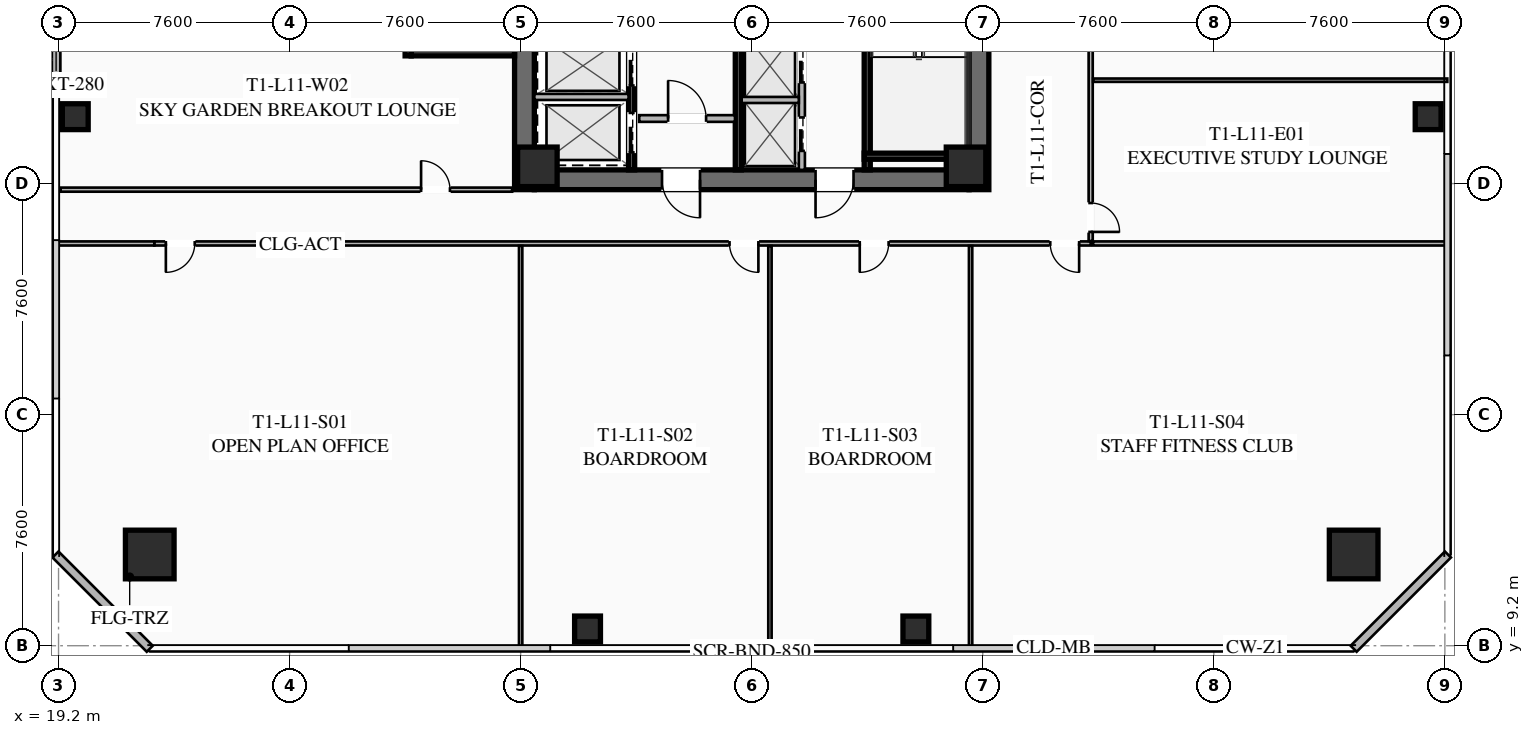
"""IFC4 building model, lengths in metres.
Left out: names, types, materials, properties, quantities, classifications, styles, units other than length and angle.
Written with IfcOpenShell. Run it as: python <this file> out.ifc"""

import sys

from ifc_helpers import new_model, si_unit, direction, frame, frame_2d, origin, origin_2d, place, context, subcontext, project, spatial, rectangle, hollow_rectangle, extrude, element, fill, save


model = new_model("IFC4")
c1 = context("Model", 3, precision=1e-05, world=origin(), true_north=direction((0.0, 1.0)))
c2 = subcontext(c1, "Body", "Model", "MODEL_VIEW")
j1 = project(units=[si_unit("LENGTHUNIT", "METRE"), si_unit("PLANEANGLEUNIT", "RADIAN")], contexts=[c1])
p1 = place(None, origin())
s1 = spatial("IfcSite", under=j1, at=p1, CompositionType="ELEMENT")
p2 = place(p1, origin())
s2 = spatial("IfcBuilding", under=s1, at=p2, CompositionType="ELEMENT")
p3 = place(p2, frame((0.0, 0.0, 45.9)))
s3 = spatial("IfcBuildingStorey", under=s2, at=p3, CompositionType="ELEMENT", Elevation=45.9)
for number, where, z_axis, x_axis in (
    (1, (34.525, 24.2, 0.0), (0.0, 0.0, 1.0), (0.0, 1.0, 0.0)),
    (2, (49.475, 39.8, 0.0), (0.0, 0.0, 1.0), (0.0, -1.0, 0.0)),
):
    element("IfcWall", number, at=place(p3, frame(where, z_axis=z_axis, x_axis=x_axis)), inside=s3, PredefinedType="SHEAR", context=c2, shape_type="SweptSolid", body=[
        extrude(rectangle(XDim=15.6, YDim=0.65, at=frame_2d((7.8, 0.0))), origin(), (0.0, 0.0, 1.0), 3.55),
    ])
p4 = place(p3, frame((49.15, 24.525, 0.0), z_axis=(0.0, 0.0, 1.0), x_axis=(-1.0, 0.0, 0.0)))
e3 = element("IfcWall", 3, at=p4, inside=s3, PredefinedType="SHEAR", context=c2, shape_type="SweptSolid", body=[
    extrude(rectangle(XDim=14.3, YDim=0.65, at=frame_2d((7.15, 0.0))), origin(), (0.0, 0.0, 1.0), 3.55),
])
p5 = place(p4, frame((8.85, 0.0, 0.0)))
e4 = element("IfcOpeningElement", 4, at=p5, cuts=e3, PredefinedType="OPENING", context=c2, shape_type="SweptSolid", body=[
    extrude(rectangle(XDim=1.25, YDim=2.25, at=frame_2d((0.625, 1.125))), frame((0.0, 0.335, 0.0), z_axis=(0.0, -1.0, 0.0), x_axis=(1.0, 0.0, 0.0)), (0.0, 0.0, 1.0), 0.67),
])
p6 = place(p4, frame((3.8, 0.0, 0.0)))
e5 = element("IfcOpeningElement", 5, at=p6, cuts=e3, PredefinedType="OPENING", context=c2, shape_type="SweptSolid", body=[
    extrude(rectangle(XDim=1.25, YDim=2.25, at=frame_2d((0.625, 1.125))), frame((0.0, 0.335, 0.0), z_axis=(0.0, -1.0, 0.0), x_axis=(1.0, 0.0, 0.0)), (0.0, 0.0, 1.0), 0.67),
])
for number, where, z_axis, x_axis in (
    (6, (34.95, 24.95, 0.0), (0.0, 0.0, 1.0), (1.0, 0.0, 0.0)),
    (7, (49.05, 24.95, 0.0), (0.0, 0.0, 1.0), (1.0, 0.0, 0.0)),
):
    element("IfcColumn", number, at=place(p3, frame(where, z_axis=z_axis, x_axis=x_axis)), inside=s3, PredefinedType="COLUMN", context=c2, shape_type="SweptSolid", body=[
        extrude(hollow_rectangle(XDim=1.3, YDim=1.3, WallThickness=0.05, at=origin_2d()), origin(), (0.0, 0.0, 1.0), 3.35),
    ])
for number, where, z_axis, x_axis in (
    (8, (22.2, 12.2, 0.0), (0.0, 0.0, 1.0), (1.0, 0.0, 0.0)),
    (9, (61.8, 12.2, 0.0), (0.0, 0.0, 1.0), (1.0, 0.0, 0.0)),
):
    element("IfcColumn", number, at=place(p3, frame(where, z_axis=z_axis, x_axis=x_axis)), inside=s3, PredefinedType="COLUMN", context=c2, shape_type="SweptSolid", body=[
        extrude(hollow_rectangle(XDim=1.6, YDim=1.6, WallThickness=0.06, at=origin_2d()), origin(), (0.0, 0.0, 1.0), 3.35),
    ])
for number, where, z_axis, x_axis in (
    (10, (36.6, 9.75, 0.0), (0.0, 0.0, 1.0), (1.0, 0.0, 0.0)),
    (11, (47.4, 9.75, 0.0), (0.0, 0.0, 1.0), (1.0, 0.0, 0.0)),
    (12, (64.25, 26.6, 0.0), (0.0, 0.0, 1.0), (1.0, 0.0, 0.0)),
    (13, (19.75, 26.6, 0.0), (0.0, 0.0, 1.0), (1.0, 0.0, 0.0)),
):
    element("IfcColumn", number, at=place(p3, frame(where, z_axis=z_axis, x_axis=x_axis)), inside=s3, PredefinedType="COLUMN", context=c2, shape_type="SweptSolid", body=[
        extrude(hollow_rectangle(XDim=0.85, YDim=0.85, WallThickness=0.035, at=origin_2d()), origin(), (0.0, 0.0, 1.0), 3.35),
    ])
p7 = place(p3, frame((19.12, 27.75, 0.0), z_axis=(0.0, 0.0, 1.0), x_axis=(0.0, 1.0, 0.0)))
e14 = element("IfcWall", 14, at=p7, inside=s3, PredefinedType="SOLIDWALL", context=c2, shape_type="SweptSolid", body=[
    extrude(rectangle(XDim=8.5, YDim=0.28, at=frame_2d((4.25, 0.0))), origin(), (0.0, 0.0, 1.0), 3.35),
])
p8 = place(p7, frame((3.6, 0.0, 0.0)))
e15 = element("IfcOpeningElement", 15, at=p8, cuts=e14, PredefinedType="OPENING", context=c2, shape_type="SweptSolid", body=[
    extrude(rectangle(XDim=1.3, YDim=2.15, at=frame_2d((0.65, 1.075))), frame((0.0, 0.15, 0.0), z_axis=(0.0, -1.0, 0.0), x_axis=(1.0, 0.0, 0.0)), (0.0, 0.0, 1.0), 0.3),
])
p9 = place(p7, frame((1.46, 0.0, 0.85)))
e16 = element("IfcOpeningElement", 16, at=p9, cuts=e14, PredefinedType="OPENING", context=c2, shape_type="SweptSolid", body=[
    extrude(rectangle(XDim=1.8, YDim=1.92, at=frame_2d((0.9, 0.96))), frame((0.0, 0.15, 0.0), z_axis=(0.0, -1.0, 0.0), x_axis=(1.0, 0.0, 0.0)), (0.0, 0.0, 1.0), 0.3),
])
for number, where, z_axis, x_axis in (
    (17, (22.2, 9.1, 0.0), (0.0, 0.0, 1.0), (-0.707, 0.707, 0.0)),
    (18, (64.9, 12.2, 0.0), (0.0, 0.0, 1.0), (-0.707, -0.707, 0.0)),
):
    element("IfcWall", number, at=place(p3, frame(where, z_axis=z_axis, x_axis=x_axis)), inside=s3, PredefinedType="SOLIDWALL", context=c2, shape_type="SweptSolid", body=[
        extrude(rectangle(XDim=4.384, YDim=0.28, at=frame_2d((2.192, 0.0))), origin(), (0.0, 0.0, 1.0), 3.35),
    ])
p10 = place(p3, frame((45.8, 32.8, 0.0), z_axis=(0.0, 0.0, 1.0), x_axis=(0.0, -1.0, 0.0)))
e19 = element("IfcWall", 19, at=p10, inside=s3, PredefinedType="SHEAR", context=c2, shape_type="SweptSolid", body=[
    extrude(rectangle(XDim=7.95, YDim=0.2, at=frame_2d((3.975, 0.0))), origin(), (0.0, 0.0, 1.0), 3.35),
])
p11 = place(p10, frame((0.45, 0.0, 0.0)))
e20 = element("IfcOpeningElement", 20, at=p11, cuts=e19, PredefinedType="OPENING", context=c2, shape_type="SweptSolid", body=[
    extrude(rectangle(XDim=1.15, YDim=2.2, at=frame_2d((0.575, 1.1))), frame((0.0, 0.11, 0.0), z_axis=(0.0, -1.0, 0.0), x_axis=(1.0, 0.0, 0.0)), (0.0, 0.0, 1.0), 0.22),
])
p12 = place(p3, frame((45.7, 25.3, 0.0), z_axis=(0.0, 0.0, 1.0), x_axis=(1.0, 0.0, 0.0)))
e21 = element("IfcWall", 21, at=p12, inside=s3, PredefinedType="SHEAR", context=c2, shape_type="SweptSolid", body=[
    extrude(rectangle(XDim=3.45, YDim=0.2, at=frame_2d((1.725, 0.0))), origin(), (0.0, 0.0, 1.0), 3.35),
])
p13 = place(p3, frame((41.56, 24.85, 0.0), z_axis=(0.0, 0.0, 1.0), x_axis=(0.0, 1.0, 0.0)))
e22 = element("IfcWall", 22, at=p13, inside=s3, PredefinedType="SHEAR", context=c2, shape_type="SweptSolid", body=[
    extrude(rectangle(XDim=14.3, YDim=0.2, at=frame_2d((7.15, 0.0))), origin(), (0.0, 0.0, 1.0), 3.35),
])
p14 = place(p3, frame((38.3, 26.54, 0.0), z_axis=(0.0, 0.0, 1.0), x_axis=(1.0, 0.0, 0.0)))
e23 = element("IfcWall", 23, at=p14, inside=s3, PredefinedType="SOLIDWALL", context=c2, shape_type="SweptSolid", body=[
    extrude(rectangle(XDim=3.15, YDim=0.22, at=frame_2d((1.575, 0.0))), origin(), (0.0, 0.0, 1.0), 2.703),
])
p15 = place(p14, frame((0.95, 0.0, 0.0)))
e24 = element("IfcOpeningElement", 24, at=p15, cuts=e23, PredefinedType="OPENING", context=c2, shape_type="SweptSolid", body=[
    extrude(rectangle(XDim=1.25, YDim=2.25, at=frame_2d((0.625, 1.125))), frame((0.0, 0.12, 0.0), z_axis=(0.0, -1.0, 0.0), x_axis=(1.0, 0.0, 0.0)), (0.0, 0.0, 1.0), 0.24),
])
p16 = place(p3, frame((38.05, 24.85, 0.0), z_axis=(0.0, 0.0, 1.0), x_axis=(0.0, 1.0, 0.0)))
e25 = element("IfcWall", 25, at=p16, inside=s3, PredefinedType="SHEAR", context=c2, shape_type="SweptSolid", body=[
    extrude(rectangle(XDim=6.35, YDim=0.2, at=frame_2d((3.175, 0.0))), origin(), (0.0, 0.0, 1.0), 3.35),
])
p17 = place(p16, frame((4.775, 0.0, 0.0)))
e26 = element("IfcOpeningElement", 26, at=p17, cuts=e25, PredefinedType="OPENING", context=c2, shape_type="SweptSolid", body=[
    extrude(rectangle(XDim=1.3, YDim=2.25, at=frame_2d((0.65, 1.125))), frame((0.0, 0.11, 0.0), z_axis=(0.0, -1.0, 0.0), x_axis=(1.0, 0.0, 0.0)), (0.0, 0.0, 1.0), 0.22),
])
p18 = place(p16, frame((2.775, 0.0, 0.0)))
e27 = element("IfcOpeningElement", 27, at=p18, cuts=e25, PredefinedType="OPENING", context=c2, shape_type="SweptSolid", body=[
    extrude(rectangle(XDim=1.3, YDim=2.25, at=frame_2d((0.65, 1.125))), frame((0.0, 0.11, 0.0), z_axis=(0.0, -1.0, 0.0), x_axis=(1.0, 0.0, 0.0)), (0.0, 0.0, 1.0), 0.22),
])
p19 = place(p16, frame((0.575, 0.0, 0.0)))
e28 = element("IfcOpeningElement", 28, at=p19, cuts=e25, PredefinedType="OPENING", context=c2, shape_type="SweptSolid", body=[
    extrude(rectangle(XDim=1.3, YDim=2.25, at=frame_2d((0.65, 1.125))), frame((0.0, 0.11, 0.0), z_axis=(0.0, -1.0, 0.0), x_axis=(1.0, 0.0, 0.0)), (0.0, 0.0, 1.0), 0.22),
])
p20 = place(p3, frame((34.85, 27.25, 0.0), z_axis=(0.0, 0.0, 1.0), x_axis=(1.0, 0.0, 0.0)))
e29 = element("IfcWall", 29, at=p20, inside=s3, PredefinedType="SOLIDWALL", context=c2, shape_type="SweptSolid", body=[
    extrude(rectangle(XDim=3.1, YDim=0.2, at=frame_2d((1.55, 0.0))), origin(), (0.0, 0.0, 1.0), 3.35),
])
p21 = place(p3, frame((43.65, 24.85, 0.0), z_axis=(0.0, 0.0, 1.0), x_axis=(0.0, 1.0, 0.0)))
e30 = element("IfcWall", 30, at=p21, inside=s3, PredefinedType="SOLIDWALL", context=c2, shape_type="SweptSolid", body=[
    extrude(rectangle(XDim=6.8, YDim=0.2, at=frame_2d((3.4, 0.0))), origin(), (0.0, 0.0, 1.0), 3.35),
])
p22 = place(p21, frame((0.625, 0.0, 0.0)))
e31 = element("IfcOpeningElement", 31, at=p22, cuts=e30, PredefinedType="OPENING", context=c2, shape_type="SweptSolid", body=[
    extrude(rectangle(XDim=1.1, YDim=2.2, at=frame_2d((0.55, 1.1))), frame((0.0, 0.11, 0.0), z_axis=(0.0, -1.0, 0.0), x_axis=(1.0, 0.0, 0.0)), (0.0, 0.0, 1.0), 0.22),
])
p23 = place(p21, frame((2.875, 0.0, 0.0)))
e32 = element("IfcOpeningElement", 32, at=p23, cuts=e30, PredefinedType="OPENING", context=c2, shape_type="SweptSolid", body=[
    extrude(rectangle(XDim=1.1, YDim=2.2, at=frame_2d((0.55, 1.1))), frame((0.0, 0.11, 0.0), z_axis=(0.0, -1.0, 0.0), x_axis=(1.0, 0.0, 0.0)), (0.0, 0.0, 1.0), 0.22),
])
p24 = place(p21, frame((5.125, 0.0, 0.0)))
e33 = element("IfcOpeningElement", 33, at=p24, cuts=e30, PredefinedType="OPENING", context=c2, shape_type="SweptSolid", body=[
    extrude(rectangle(XDim=1.1, YDim=2.2, at=frame_2d((0.55, 1.1))), frame((0.0, 0.11, 0.0), z_axis=(0.0, -1.0, 0.0), x_axis=(1.0, 0.0, 0.0)), (0.0, 0.0, 1.0), 0.22),
])
p25 = place(p3, frame((41.67, 27.15, 0.0), z_axis=(0.0, 0.0, 1.0), x_axis=(1.0, 0.0, 0.0)))
e34 = element("IfcWall", 34, at=p25, inside=s3, PredefinedType="SOLIDWALL", context=c2, shape_type="SweptSolid", body=[
    extrude(rectangle(XDim=1.88, YDim=0.2, at=frame_2d((0.94, 0.0))), origin(), (0.0, 0.0, 1.0), 3.35),
])
p26 = place(p3, frame((30.7, 28.6, 0.0), z_axis=(0.0, 0.0, 1.0), x_axis=(0.0, 1.0, 0.0)))
e35 = element("IfcWall", 35, at=p26, inside=s3, PredefinedType="SHEAR", context=c2, shape_type="SweptSolid", body=[
    extrude(rectangle(XDim=6.8, YDim=0.2, at=frame_2d((3.4, 0.0))), origin(), (0.0, 0.0, 1.0), 3.35),
])
p27 = place(p3, frame((30.8, 28.7, 0.0), z_axis=(0.0, 0.0, 1.0), x_axis=(1.0, 0.0, 0.0)))
e36 = element("IfcWall", 36, at=p27, inside=s3, PredefinedType="SHEAR", context=c2, shape_type="SweptSolid", body=[
    extrude(rectangle(XDim=3.4, YDim=0.2, at=frame_2d((1.7, 0.0))), origin(), (0.0, 0.0, 1.0), 3.35),
])
p28 = place(p3, frame((53.15, 22.43, 0.0), z_axis=(0.0, 0.0, 1.0), x_axis=(-1.0, 0.0, 0.0)))
e37 = element("IfcWall", 37, at=p28, inside=s3, PredefinedType="PARTITIONING", context=c2, shape_type="SweptSolid", body=[
    extrude(rectangle(XDim=30.8, YDim=0.135, at=frame_2d((15.4, 0.0))), origin(), (0.0, 0.0, 1.0), 2.703),
])
p29 = place(p28, frame((29.47, 0.0, 0.0)))
e38 = element("IfcOpeningElement", 38, at=p29, cuts=e37, PredefinedType="OPENING", context=c2, shape_type="SweptSolid", body=[
    extrude(rectangle(XDim=0.95, YDim=2.05, at=frame_2d((0.475, 1.025))), frame((0.0, 0.077, 0.0), z_axis=(0.0, -1.0, 0.0), x_axis=(1.0, 0.0, 0.0)), (0.0, 0.0, 1.0), 0.155),
])
p30 = place(p28, frame((10.93, 0.0, 0.0)))
e39 = element("IfcOpeningElement", 39, at=p30, cuts=e37, PredefinedType="OPENING", context=c2, shape_type="SweptSolid", body=[
    extrude(rectangle(XDim=0.95, YDim=2.05, at=frame_2d((0.475, 1.025))), frame((0.0, 0.077, 0.0), z_axis=(0.0, -1.0, 0.0), x_axis=(1.0, 0.0, 0.0)), (0.0, 0.0, 1.0), 0.155),
])
p31 = place(p28, frame((6.646, 0.0, 0.0)))
e40 = element("IfcOpeningElement", 40, at=p31, cuts=e37, PredefinedType="OPENING", context=c2, shape_type="SweptSolid", body=[
    extrude(rectangle(XDim=0.95, YDim=2.05, at=frame_2d((0.475, 1.025))), frame((0.0, 0.077, 0.0), z_axis=(0.0, -1.0, 0.0), x_axis=(1.0, 0.0, 0.0)), (0.0, 0.0, 1.0), 0.155),
])
p32 = place(p28, frame((0.38, 0.0, 0.0)))
e41 = element("IfcOpeningElement", 41, at=p32, cuts=e37, PredefinedType="OPENING", context=c2, shape_type="SweptSolid", body=[
    extrude(rectangle(XDim=0.95, YDim=2.05, at=frame_2d((0.475, 1.025))), frame((0.0, 0.077, 0.0), z_axis=(0.0, -1.0, 0.0), x_axis=(1.0, 0.0, 0.0)), (0.0, 0.0, 1.0), 0.155),
])
p33 = place(p3, frame((19.12, 22.43, 0.0), z_axis=(0.0, 0.0, 1.0), x_axis=(1.0, 0.0, 0.0)))
e42 = element("IfcWall", 42, at=p33, inside=s3, PredefinedType="PARTITIONING", context=c2, shape_type="SweptSolid", body=[
    extrude(rectangle(XDim=3.23, YDim=0.135, at=frame_2d((1.615, 0.0))), origin(), (0.0, 0.0, 1.0), 2.703),
])
for number, where, z_axis, x_axis in (
    (43, (34.4, 9.12, 0.0), (0.0, 0.0, 1.0), (0.0, 1.0, 0.0)),
    (44, (42.6, 9.12, 0.0), (0.0, 0.0, 1.0), (0.0, 1.0, 0.0)),
    (45, (49.2, 9.12, 0.0), (0.0, 0.0, 1.0), (0.0, 1.0, 0.0)),
):
    element("IfcWall", number, at=place(p3, frame(where, z_axis=z_axis, x_axis=x_axis)), inside=s3, PredefinedType="PARTITIONING", context=c2, shape_type="SweptSolid", body=[
        extrude(rectangle(XDim=13.23, YDim=0.11, at=frame_2d((6.615, 0.0))), origin(), (0.0, 0.0, 1.0), 2.703),
    ])
p34 = place(p3, frame((53.15, 42.02, 0.0), z_axis=(0.0, 0.0, 1.0), x_axis=(0.0, -1.0, 0.0)))
e46 = element("IfcWall", 46, at=p34, inside=s3, PredefinedType="PARTITIONING", context=c2, shape_type="SweptSolid", body=[
    extrude(rectangle(XDim=19.51, YDim=0.135, at=frame_2d((9.755, 0.0))), origin(), (0.0, 0.0, 1.0), 2.703),
])
p35 = place(p34, frame((18.26, 0.0, 0.0)))
e47 = element("IfcOpeningElement", 47, at=p35, cuts=e46, PredefinedType="OPENING", context=c2, shape_type="SweptSolid", body=[
    extrude(rectangle(XDim=0.95, YDim=2.05, at=frame_2d((0.475, 1.025))), frame((0.0, 0.077, 0.0), z_axis=(0.0, -1.0, 0.0), x_axis=(1.0, 0.0, 0.0)), (0.0, 0.0, 1.0), 0.155),
])
p36 = place(p34, frame((9.365, 0.0, 0.0)))
e48 = element("IfcOpeningElement", 48, at=p36, cuts=e46, PredefinedType="OPENING", context=c2, shape_type="SweptSolid", body=[
    extrude(rectangle(XDim=0.95, YDim=2.05, at=frame_2d((0.475, 1.025))), frame((0.0, 0.077, 0.0), z_axis=(0.0, -1.0, 0.0), x_axis=(1.0, 0.0, 0.0)), (0.0, 0.0, 1.0), 0.155),
])
p37 = place(p3, frame((53.23, 22.43, 0.0), z_axis=(0.0, 0.0, 1.0), x_axis=(1.0, 0.0, 0.0)))
e49 = element("IfcWall", 49, at=p37, inside=s3, PredefinedType="PARTITIONING", context=c2, shape_type="SweptSolid", body=[
    extrude(rectangle(XDim=11.65, YDim=0.135, at=frame_2d((5.825, 0.0))), origin(), (0.0, 0.0, 1.0), 2.703),
])
p38 = place(p3, frame((53.23, 27.8, 0.0), z_axis=(0.0, 0.0, 1.0), x_axis=(1.0, 0.0, 0.0)))
e50 = element("IfcWall", 50, at=p38, inside=s3, PredefinedType="PARTITIONING", context=c2, shape_type="SweptSolid", body=[
    extrude(rectangle(XDim=11.65, YDim=0.11, at=frame_2d((5.825, 0.0))), origin(), (0.0, 0.0, 1.0), 2.703),
])
p39 = place(p3, frame((19.27, 24.2, 0.0), z_axis=(0.0, 0.0, 1.0), x_axis=(1.0, 0.0, 0.0)))
e51 = element("IfcWall", 51, at=p39, inside=s3, PredefinedType="PARTITIONING", context=c2, shape_type="SweptSolid", body=[
    extrude(rectangle(XDim=14.85, YDim=0.135, at=frame_2d((7.425, 0.0))), origin(), (0.0, 0.0, 1.0), 2.703),
])
p40 = place(p39, frame((11.855, 0.0, 0.0)))
e52 = element("IfcOpeningElement", 52, at=p40, cuts=e51, PredefinedType="OPENING", context=c2, shape_type="SweptSolid", body=[
    extrude(rectangle(XDim=0.95, YDim=2.05, at=frame_2d((0.475, 1.025))), frame((0.0, 0.077, 0.0), z_axis=(0.0, -1.0, 0.0), x_axis=(1.0, 0.0, 0.0)), (0.0, 0.0, 1.0), 0.155),
])
p41 = place(p5, origin())
e53 = element("IfcDoor", 53, at=p41, inside=s3, OperationType="SINGLE_SWING_LEFT", PredefinedType="DOOR", context=c2, shape_type="SweptSolid", body=[
    extrude(rectangle(XDim=1.25, YDim=2.25, at=frame_2d((0.625, 1.125))), frame((0.0, 0.025, 0.0), z_axis=(0.0, -1.0, 0.0), x_axis=(1.0, 0.0, 0.0)), (0.0, 0.0, 1.0), 0.05),
])
fill(e4, e53)
p42 = place(p6, origin())
e54 = element("IfcDoor", 54, at=p42, inside=s3, OperationType="SINGLE_SWING_RIGHT", PredefinedType="DOOR", context=c2, shape_type="SweptSolid", body=[
    extrude(rectangle(XDim=1.25, YDim=2.25, at=frame_2d((0.625, 1.125))), frame((0.0, 0.025, 0.0), z_axis=(0.0, -1.0, 0.0), x_axis=(1.0, 0.0, 0.0)), (0.0, 0.0, 1.0), 0.05),
])
fill(e5, e54)
p43 = place(p15, origin())
e55 = element("IfcDoor", 55, at=p43, inside=s3, OperationType="SINGLE_SWING_LEFT", PredefinedType="DOOR", context=c2, shape_type="SweptSolid", body=[
    extrude(rectangle(XDim=1.25, YDim=2.25, at=frame_2d((0.625, 1.125))), frame((0.0, 0.025, 0.0), z_axis=(0.0, -1.0, 0.0), x_axis=(1.0, 0.0, 0.0)), (0.0, 0.0, 1.0), 0.05),
])
fill(e24, e55)
p44 = place(p29, origin())
e56 = element("IfcDoor", 56, at=p44, inside=s3, OperationType="SINGLE_SWING_RIGHT", PredefinedType="DOOR", context=c2, shape_type="SweptSolid", body=[
    extrude(rectangle(XDim=0.95, YDim=2.05, at=frame_2d((0.475, 1.025))), frame((0.0, 0.025, 0.0), z_axis=(0.0, -1.0, 0.0), x_axis=(1.0, 0.0, 0.0)), (0.0, 0.0, 1.0), 0.05),
])
fill(e38, e56)
p45 = place(p30, origin())
e57 = element("IfcDoor", 57, at=p45, inside=s3, OperationType="SINGLE_SWING_LEFT", PredefinedType="DOOR", context=c2, shape_type="SweptSolid", body=[
    extrude(rectangle(XDim=0.95, YDim=2.05, at=frame_2d((0.475, 1.025))), frame((0.0, 0.025, 0.0), z_axis=(0.0, -1.0, 0.0), x_axis=(1.0, 0.0, 0.0)), (0.0, 0.0, 1.0), 0.05),
])
fill(e39, e57)
p46 = place(p31, origin())
e58 = element("IfcDoor", 58, at=p46, inside=s3, OperationType="SINGLE_SWING_RIGHT", PredefinedType="DOOR", context=c2, shape_type="SweptSolid", body=[
    extrude(rectangle(XDim=0.95, YDim=2.05, at=frame_2d((0.475, 1.025))), frame((0.0, 0.025, 0.0), z_axis=(0.0, -1.0, 0.0), x_axis=(1.0, 0.0, 0.0)), (0.0, 0.0, 1.0), 0.05),
])
fill(e40, e58)
p47 = place(p32, origin())
e59 = element("IfcDoor", 59, at=p47, inside=s3, OperationType="SINGLE_SWING_LEFT", PredefinedType="DOOR", context=c2, shape_type="SweptSolid", body=[
    extrude(rectangle(XDim=0.95, YDim=2.05, at=frame_2d((0.475, 1.025))), frame((0.0, 0.025, 0.0), z_axis=(0.0, -1.0, 0.0), x_axis=(1.0, 0.0, 0.0)), (0.0, 0.0, 1.0), 0.05),
])
fill(e41, e59)
p48 = place(p35, origin())
e60 = element("IfcDoor", 60, at=p48, inside=s3, OperationType="SINGLE_SWING_RIGHT", PredefinedType="DOOR", context=c2, shape_type="SweptSolid", body=[
    extrude(rectangle(XDim=0.95, YDim=2.05, at=frame_2d((0.475, 1.025))), frame((0.0, 0.025, 0.0), z_axis=(0.0, -1.0, 0.0), x_axis=(1.0, 0.0, 0.0)), (0.0, 0.0, 1.0), 0.05),
])
fill(e47, e60)
p49 = place(p40, origin())
e61 = element("IfcDoor", 61, at=p49, inside=s3, OperationType="SINGLE_SWING_LEFT", PredefinedType="DOOR", context=c2, shape_type="SweptSolid", body=[
    extrude(rectangle(XDim=0.95, YDim=2.05, at=frame_2d((0.475, 1.025))), frame((0.0, 0.025, 0.0), z_axis=(0.0, -1.0, 0.0), x_axis=(1.0, 0.0, 0.0)), (0.0, 0.0, 1.0), 0.05),
])
fill(e52, e61)
p50 = place(p18, origin())
e62 = element("IfcDoor", 62, at=p50, inside=s3, OperationType="SLIDING_TO_LEFT", PredefinedType="DOOR", context=c2, shape_type="SweptSolid", body=[
    extrude(rectangle(XDim=1.3, YDim=2.25, at=frame_2d((0.65, 1.125))), frame((0.0, 0.025, 0.0), z_axis=(0.0, -1.0, 0.0), x_axis=(1.0, 0.0, 0.0)), (0.0, 0.0, 1.0), 0.05),
])
fill(e27, e62)
p51 = place(p19, origin())
e63 = element("IfcDoor", 63, at=p51, inside=s3, OperationType="SLIDING_TO_LEFT", PredefinedType="DOOR", context=c2, shape_type="SweptSolid", body=[
    extrude(rectangle(XDim=1.3, YDim=2.25, at=frame_2d((0.65, 1.125))), frame((0.0, 0.025, 0.0), z_axis=(0.0, -1.0, 0.0), x_axis=(1.0, 0.0, 0.0)), (0.0, 0.0, 1.0), 0.05),
])
fill(e28, e63)
p52 = place(p22, origin())
e64 = element("IfcDoor", 64, at=p52, inside=s3, OperationType="SLIDING_TO_LEFT", PredefinedType="DOOR", context=c2, shape_type="SweptSolid", body=[
    extrude(rectangle(XDim=1.1, YDim=2.2, at=frame_2d((0.55, 1.1))), frame((0.0, 0.025, 0.0), z_axis=(0.0, -1.0, 0.0), x_axis=(1.0, 0.0, 0.0)), (0.0, 0.0, 1.0), 0.05),
])
fill(e31, e64)
p53 = place(p23, origin())
e65 = element("IfcDoor", 65, at=p53, inside=s3, OperationType="SLIDING_TO_LEFT", PredefinedType="DOOR", context=c2, shape_type="SweptSolid", body=[
    extrude(rectangle(XDim=1.1, YDim=2.2, at=frame_2d((0.55, 1.1))), frame((0.0, 0.025, 0.0), z_axis=(0.0, -1.0, 0.0), x_axis=(1.0, 0.0, 0.0)), (0.0, 0.0, 1.0), 0.05),
])
fill(e32, e65)
save(model, sys.argv[1])
